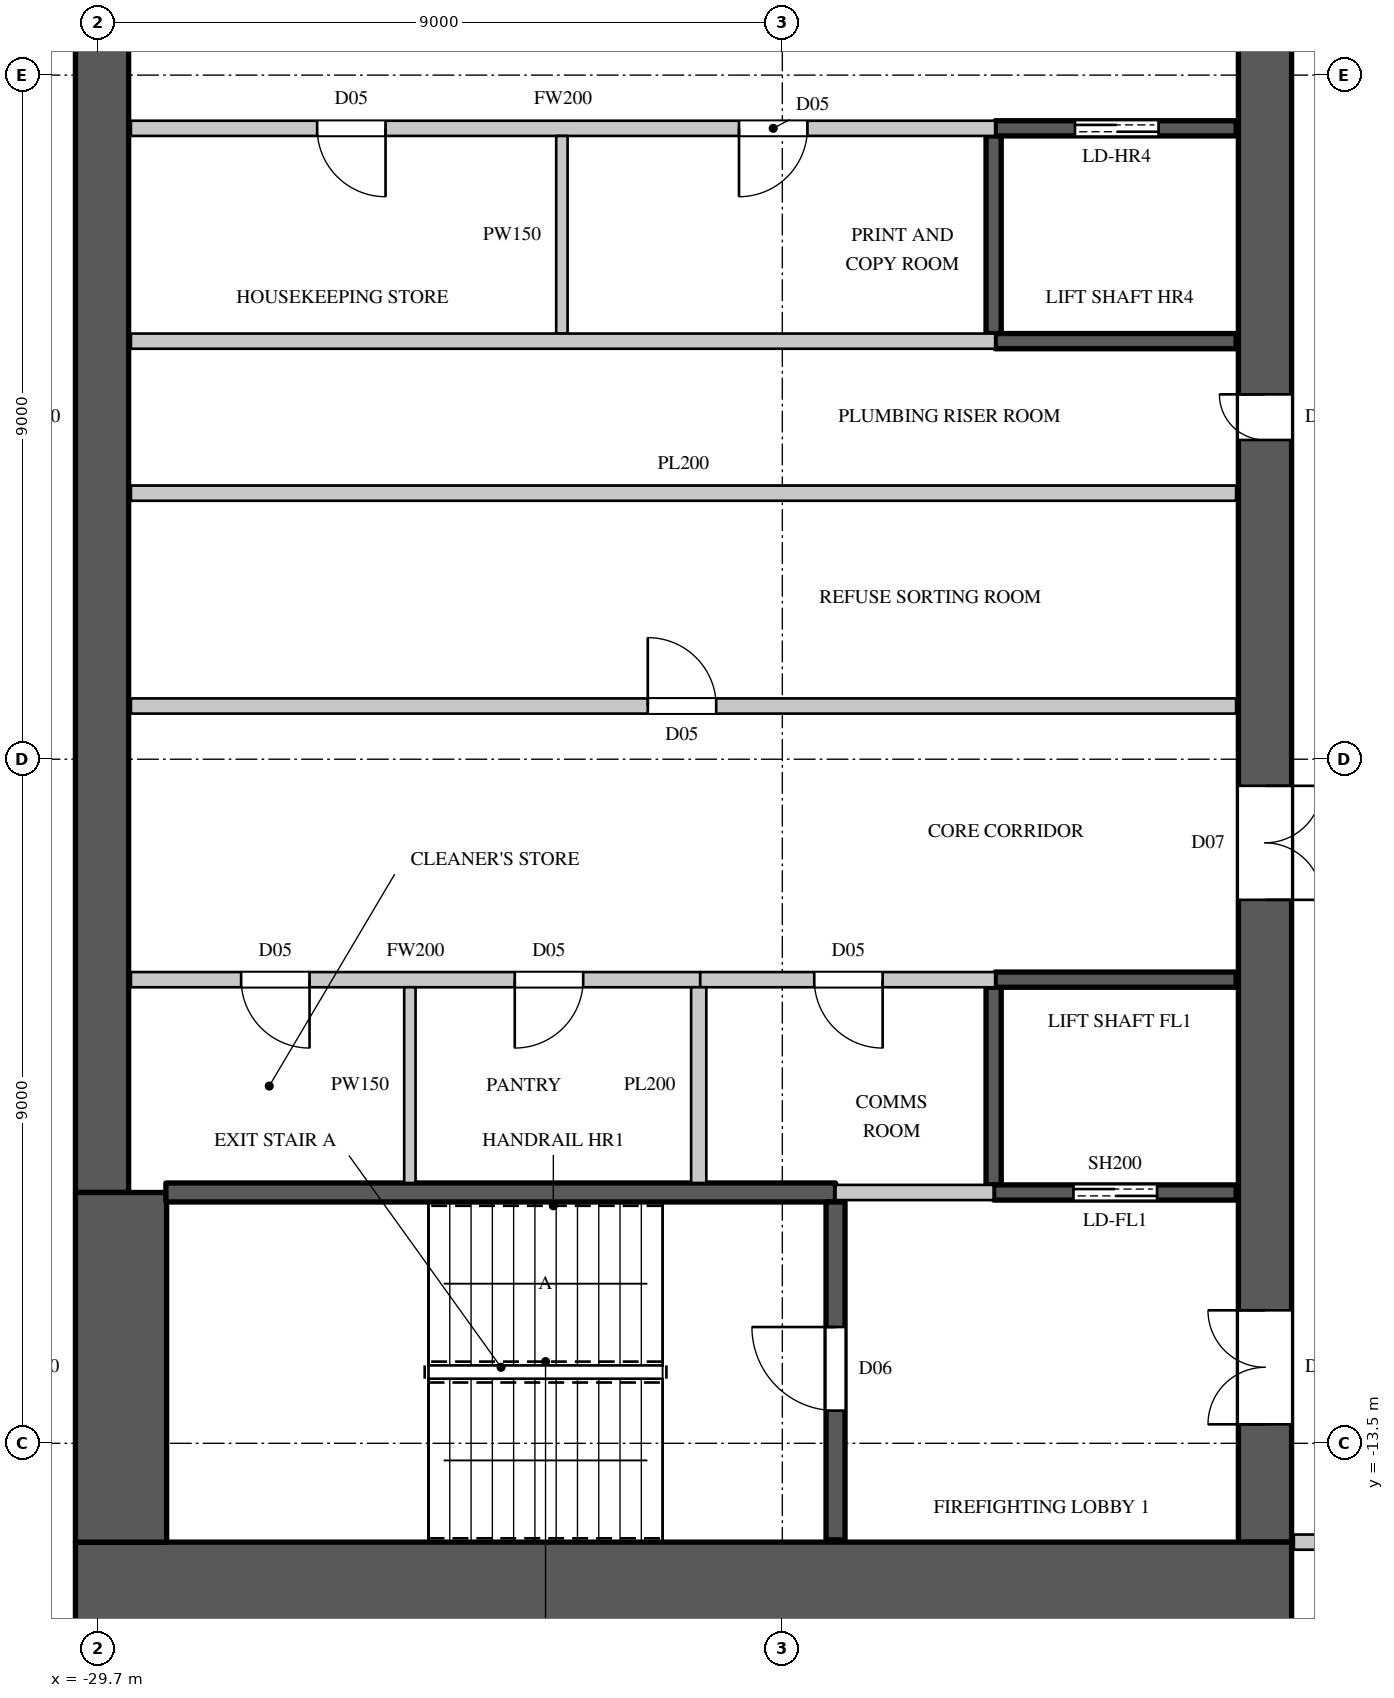
"""IFC4 building model, lengths in metres.
Left out: names, types, materials, properties, quantities, classifications, styles, units other than length and angle.
Written with IfcOpenShell. Run it as: python <this file> out.ifc"""

import sys

from ifc_helpers import new_model, si_unit, direction, frame, frame_2d, origin, place, context, subcontext, project, spatial, rectangle, extrude, element, fill, save


model = new_model("IFC4")
c1 = context("Model", 3, precision=1e-05, world=origin(), true_north=direction((0.0, 1.0)))
c2 = subcontext(c1, "Body", "Model", "MODEL_VIEW")
j1 = project(units=[si_unit("LENGTHUNIT", "METRE"), si_unit("PLANEANGLEUNIT", "RADIAN")], contexts=[c1])
p1 = place(None, origin())
s1 = spatial("IfcSite", under=j1, at=p1, CompositionType="ELEMENT")
p2 = place(p1, origin())
s2 = spatial("IfcBuilding", under=s1, at=p2, CompositionType="ELEMENT")
p3 = place(p2, frame((0.0, 0.0, 309.0)))
s3 = spatial("IfcBuildingStorey", under=s2, at=p3, CompositionType="ELEMENT", Elevation=309.0)
p4 = place(p3, frame((-30.0, -15.4, 0.0), z_axis=(0.0, 0.0, 1.0), x_axis=(1.0, 0.0, 0.0)))
e1 = element("IfcWall", 1, at=p4, inside=s3, PredefinedType="SHEAR", context=c2, shape_type="SweptSolid", body=[
    extrude(rectangle(XDim=16.0, YDim=1.2, at=frame_2d((8.0, 0.0))), origin(), (0.0, 0.0, 1.0), 4.1),
])
p5 = place(p3, frame((-14.35, -14.8, 0.0), z_axis=(0.0, 0.0, 1.0), x_axis=(0.0, 1.0, 0.0)))
e2 = element("IfcWall", 2, at=p5, inside=s3, PredefinedType="SHEAR", context=c2, shape_type="SweptSolid", body=[
    extrude(rectangle(XDim=29.6, YDim=0.7, at=frame_2d((14.8, 0.0))), origin(), (0.0, 0.0, 1.0), 4.1),
])
p6 = place(p5, frame((1.55, 0.0, 0.0)))
e3 = element("IfcOpeningElement", 3, at=p6, cuts=e2, PredefinedType="OPENING", context=c2, shape_type="SweptSolid", body=[
    extrude(rectangle(XDim=1.5, YDim=2.4, at=frame_2d((0.75, 1.2))), frame((0.0, 0.36, 0.0), z_axis=(0.0, -1.0, 0.0), x_axis=(1.0, 0.0, 0.0)), (0.0, 0.0, 1.0), 0.72),
])
p7 = place(p5, frame((26.55, 0.0, 0.0)))
e4 = element("IfcOpeningElement", 4, at=p7, cuts=e2, PredefinedType="OPENING", context=c2, shape_type="SweptSolid", body=[
    extrude(rectangle(XDim=1.5, YDim=2.4, at=frame_2d((0.75, 1.2))), frame((0.0, 0.36, 0.0), z_axis=(0.0, -1.0, 0.0), x_axis=(1.0, 0.0, 0.0)), (0.0, 0.0, 1.0), 0.72),
])
p8 = place(p5, frame((8.45, 0.0, 0.0)))
e5 = element("IfcOpeningElement", 5, at=p8, cuts=e2, PredefinedType="OPENING", context=c2, shape_type="SweptSolid", body=[
    extrude(rectangle(XDim=1.5, YDim=2.4, at=frame_2d((0.75, 1.2))), frame((0.0, 0.36, 0.0), z_axis=(0.0, -1.0, 0.0), x_axis=(1.0, 0.0, 0.0)), (0.0, 0.0, 1.0), 0.72),
])
p9 = place(p5, frame((19.65, 0.0, 0.0)))
e6 = element("IfcOpeningElement", 6, at=p9, cuts=e2, PredefinedType="OPENING", context=c2, shape_type="SweptSolid", body=[
    extrude(rectangle(XDim=1.5, YDim=2.4, at=frame_2d((0.75, 1.2))), frame((0.0, 0.36, 0.0), z_axis=(0.0, -1.0, 0.0), x_axis=(1.0, 0.0, 0.0)), (0.0, 0.0, 1.0), 0.72),
])
p10 = place(p5, frame((14.5, 0.0, 0.0)))
e7 = element("IfcOpeningElement", 7, at=p10, cuts=e2, PredefinedType="OPENING", context=c2, shape_type="SweptSolid", body=[
    extrude(rectangle(XDim=0.6, YDim=2.0, at=frame_2d((0.3, 1.0))), frame((0.0, 0.36, 0.0), z_axis=(0.0, -1.0, 0.0), x_axis=(1.0, 0.0, 0.0)), (0.0, 0.0, 1.0), 0.72),
])
p11 = place(p3, frame((-29.65, -10.2, 0.0), z_axis=(0.0, 0.0, 1.0), x_axis=(0.0, 1.0, 0.0)))
e8 = element("IfcWall", 8, at=p11, inside=s3, PredefinedType="SHEAR", context=c2, shape_type="SweptSolid", body=[
    extrude(rectangle(XDim=20.4, YDim=0.7, at=frame_2d((10.2, 0.0))), origin(), (0.0, 0.0, 1.0), 4.1),
])
p12 = place(p3, frame((-29.4, -14.8, 0.0), z_axis=(0.0, 0.0, 1.0), x_axis=(0.0, 1.0, 0.0)))
e9 = element("IfcWall", 9, at=p12, inside=s3, PredefinedType="SHEAR", context=c2, shape_type="SweptSolid", body=[
    extrude(rectangle(XDim=4.6, YDim=1.2, at=frame_2d((2.3, 0.0))), origin(), (0.0, 0.0, 1.0), 4.1),
])
p13 = place(p3, frame((-29.27, -7.4, 0.0), z_axis=(0.0, 0.0, 1.0), x_axis=(1.0, 0.0, 0.0)))
e10 = element("IfcWall", 10, at=p13, inside=s3, PredefinedType="PARTITIONING", context=c2, shape_type="SweptSolid", body=[
    extrude(rectangle(XDim=7.49, YDim=0.2, at=frame_2d((3.745, 0.0))), origin(), (0.0, 0.0, 1.0), 3.8),
])
p14 = place(p13, frame((1.45, 0.0, 0.0)))
e11 = element("IfcOpeningElement", 11, at=p14, cuts=e10, PredefinedType="OPENING", context=c2, shape_type="SweptSolid", body=[
    extrude(rectangle(XDim=0.9, YDim=2.2, at=frame_2d((0.45, 1.1))), frame((0.0, 0.11, 0.0), z_axis=(0.0, -1.0, 0.0), x_axis=(1.0, 0.0, 0.0)), (0.0, 0.0, 1.0), 0.22),
])
p15 = place(p13, frame((5.05, 0.0, 0.0)))
e12 = element("IfcOpeningElement", 12, at=p15, cuts=e10, PredefinedType="OPENING", context=c2, shape_type="SweptSolid", body=[
    extrude(rectangle(XDim=0.9, YDim=2.2, at=frame_2d((0.45, 1.1))), frame((0.0, 0.11, 0.0), z_axis=(0.0, -1.0, 0.0), x_axis=(1.0, 0.0, 0.0)), (0.0, 0.0, 1.0), 0.22),
])
p16 = place(p3, frame((-29.27, -3.8, 0.0), z_axis=(0.0, 0.0, 1.0), x_axis=(1.0, 0.0, 0.0)))
e13 = element("IfcWall", 13, at=p16, inside=s3, PredefinedType="PARTITIONING", context=c2, shape_type="SweptSolid", body=[
    extrude(rectangle(XDim=14.54, YDim=0.2, at=frame_2d((7.27, 0.0))), origin(), (0.0, 0.0, 1.0), 3.8),
])
p17 = place(p16, frame((6.8, 0.0, 0.0)))
e14 = element("IfcOpeningElement", 14, at=p17, cuts=e13, PredefinedType="OPENING", context=c2, shape_type="SweptSolid", body=[
    extrude(rectangle(XDim=0.9, YDim=2.2, at=frame_2d((0.45, 1.1))), frame((0.0, 0.11, 0.0), z_axis=(0.0, -1.0, 0.0), x_axis=(1.0, 0.0, 0.0)), (0.0, 0.0, 1.0), 0.22),
])
p18 = place(p3, frame((-29.27, 3.8, 0.0), z_axis=(0.0, 0.0, 1.0), x_axis=(1.0, 0.0, 0.0)))
e15 = element("IfcWall", 15, at=p18, inside=s3, PredefinedType="PARTITIONING", context=c2, shape_type="SweptSolid", body=[
    extrude(rectangle(XDim=11.37, YDim=0.2, at=frame_2d((5.685, 0.0))), origin(), (0.0, 0.0, 1.0), 3.8),
])
p19 = place(p18, frame((2.45, 0.0, 0.0)))
e16 = element("IfcOpeningElement", 16, at=p19, cuts=e15, PredefinedType="OPENING", context=c2, shape_type="SweptSolid", body=[
    extrude(rectangle(XDim=0.9, YDim=2.2, at=frame_2d((0.45, 1.1))), frame((0.0, 0.11, 0.0), z_axis=(0.0, -1.0, 0.0), x_axis=(1.0, 0.0, 0.0)), (0.0, 0.0, 1.0), 0.22),
])
p20 = place(p18, frame((8.0, 0.0, 0.0)))
e17 = element("IfcOpeningElement", 17, at=p20, cuts=e15, PredefinedType="OPENING", context=c2, shape_type="SweptSolid", body=[
    extrude(rectangle(XDim=0.9, YDim=2.2, at=frame_2d((0.45, 1.1))), frame((0.0, 0.11, 0.0), z_axis=(0.0, -1.0, 0.0), x_axis=(1.0, 0.0, 0.0)), (0.0, 0.0, 1.0), 0.22),
])
p21 = place(p3, frame((-13.97, -14.8, 0.0), z_axis=(0.0, 0.0, 1.0), x_axis=(1.0, 0.0, 0.0)))
e18 = element("IfcWall", 18, at=p21, inside=s3, PredefinedType="PARTITIONING", context=c2, shape_type="SweptSolid", body=[
    extrude(rectangle(XDim=2.87, YDim=0.2, at=frame_2d((1.435, 0.0))), origin(), (0.0, 0.0, 1.0), 3.8),
])
p22 = place(p3, frame((-25.6, -10.075, 0.0), z_axis=(0.0, 0.0, 1.0), x_axis=(0.0, 1.0, 0.0)))
e19 = element("IfcWall", 19, at=p22, inside=s3, PredefinedType="PARTITIONING", context=c2, shape_type="SweptSolid", body=[
    extrude(rectangle(XDim=2.575, YDim=0.15, at=frame_2d((1.288, 0.0))), origin(), (0.0, 0.0, 1.0), 3.8),
])
p23 = place(p3, frame((-23.6, 1.1, 0.0), z_axis=(0.0, 0.0, 1.0), x_axis=(0.0, 1.0, 0.0)))
e20 = element("IfcWall", 20, at=p23, inside=s3, PredefinedType="PARTITIONING", context=c2, shape_type="SweptSolid", body=[
    extrude(rectangle(XDim=2.6, YDim=0.15, at=frame_2d((1.3, 0.0))), origin(), (0.0, 0.0, 1.0), 3.8),
])
p24 = place(p3, frame((-29.27, -1.0, 0.0), z_axis=(0.0, 0.0, 1.0), x_axis=(1.0, 0.0, 0.0)))
e21 = element("IfcWall", 21, at=p24, inside=s3, PredefinedType="PARTITIONING", context=c2, shape_type="SweptSolid", body=[
    extrude(rectangle(XDim=14.54, YDim=0.2, at=frame_2d((7.27, 0.0))), origin(), (0.0, 0.0, 1.0), 3.8),
])
p25 = place(p3, frame((-29.27, 1.0, 0.0), z_axis=(0.0, 0.0, 1.0), x_axis=(1.0, 0.0, 0.0)))
e22 = element("IfcWall", 22, at=p25, inside=s3, PredefinedType="PARTITIONING", context=c2, shape_type="SweptSolid", body=[
    extrude(rectangle(XDim=11.37, YDim=0.2, at=frame_2d((5.685, 0.0))), origin(), (0.0, 0.0, 1.0), 3.8),
])
p26 = place(p3, frame((-21.78, -7.4, 0.0), z_axis=(0.0, 0.0, 1.0), x_axis=(1.0, 0.0, 0.0)))
e23 = element("IfcWall", 23, at=p26, inside=s3, PredefinedType="PARTITIONING", context=c2, shape_type="SweptSolid", body=[
    extrude(rectangle(XDim=3.88, YDim=0.2, at=frame_2d((1.94, 0.0))), origin(), (0.0, 0.0, 1.0), 3.8),
])
p27 = place(p26, frame((1.5, 0.0, 0.0)))
e24 = element("IfcOpeningElement", 24, at=p27, cuts=e23, PredefinedType="OPENING", context=c2, shape_type="SweptSolid", body=[
    extrude(rectangle(XDim=0.9, YDim=2.2, at=frame_2d((0.45, 1.1))), frame((0.0, 0.11, 0.0), z_axis=(0.0, -1.0, 0.0), x_axis=(1.0, 0.0, 0.0)), (0.0, 0.0, 1.0), 0.22),
])
p28 = place(p3, frame((-21.8, -10.075, 0.0), z_axis=(0.0, 0.0, 1.0), x_axis=(0.0, 1.0, 0.0)))
e25 = element("IfcWall", 25, at=p28, inside=s3, PredefinedType="PARTITIONING", context=c2, shape_type="SweptSolid", body=[
    extrude(rectangle(XDim=2.575, YDim=0.2, at=frame_2d((1.288, 0.0))), origin(), (0.0, 0.0, 1.0), 3.8),
])
p29 = place(p3, frame((-20.0, -10.2, 0.0), z_axis=(0.0, 0.0, 1.0), x_axis=(1.0, 0.0, 0.0)))
e26 = element("IfcWall", 26, at=p29, inside=s3, PredefinedType="PARTITIONING", context=c2, shape_type="SweptSolid", body=[
    extrude(rectangle(XDim=2.08, YDim=0.2, at=frame_2d((1.04, 0.0))), origin(), (0.0, 0.0, 1.0), 3.8),
])
p30 = place(p3, frame((-17.92, -10.1, 0.0), z_axis=(0.0, 0.0, 1.0), x_axis=(0.0, 1.0, 0.0)))
e27 = element("IfcWall", 27, at=p30, inside=s3, PredefinedType="SHEAR", context=c2, shape_type="SweptSolid", body=[
    extrude(rectangle(XDim=2.6, YDim=0.2, at=frame_2d((1.3, 0.0))), origin(), (0.0, 0.0, 1.0), 3.8),
])
p31 = place(p3, frame((-17.92, -10.2, 0.0), z_axis=(0.0, 0.0, 1.0), x_axis=(1.0, 0.0, 0.0)))
e28 = element("IfcWall", 28, at=p31, inside=s3, PredefinedType="SHEAR", context=c2, shape_type="SweptSolid", body=[
    extrude(rectangle(XDim=3.19, YDim=0.2, at=frame_2d((1.595, 0.0))), origin(), (0.0, 0.0, 1.0), 3.8),
])
p32 = place(p31, frame((1.05, 0.0, 0.0)))
e29 = element("IfcOpeningElement", 29, at=p32, cuts=e28, PredefinedType="OPENING", context=c2, shape_type="SweptSolid", body=[
    extrude(rectangle(XDim=1.1, YDim=2.2, at=frame_2d((0.55, 1.1))), frame((0.0, 0.11, 0.0), z_axis=(0.0, -1.0, 0.0), x_axis=(1.0, 0.0, 0.0)), (0.0, 0.0, 1.0), 0.22),
])
p33 = place(p3, frame((-17.9, -7.4, 0.0), z_axis=(0.0, 0.0, 1.0), x_axis=(1.0, 0.0, 0.0)))
e30 = element("IfcWall", 30, at=p33, inside=s3, PredefinedType="SHEAR", context=c2, shape_type="SweptSolid", body=[
    extrude(rectangle(XDim=3.17, YDim=0.2, at=frame_2d((1.585, 0.0))), origin(), (0.0, 0.0, 1.0), 3.8),
])
p34 = place(p3, frame((-17.92, 1.1, 0.0), z_axis=(0.0, 0.0, 1.0), x_axis=(0.0, 1.0, 0.0)))
e31 = element("IfcWall", 31, at=p34, inside=s3, PredefinedType="SHEAR", context=c2, shape_type="SweptSolid", body=[
    extrude(rectangle(XDim=2.6, YDim=0.2, at=frame_2d((1.3, 0.0))), origin(), (0.0, 0.0, 1.0), 3.8),
])
p35 = place(p3, frame((-17.9, 1.0, 0.0), z_axis=(0.0, 0.0, 1.0), x_axis=(1.0, 0.0, 0.0)))
e32 = element("IfcWall", 32, at=p35, inside=s3, PredefinedType="SHEAR", context=c2, shape_type="SweptSolid", body=[
    extrude(rectangle(XDim=3.17, YDim=0.2, at=frame_2d((1.585, 0.0))), origin(), (0.0, 0.0, 1.0), 3.8),
])
p36 = place(p3, frame((-17.9, 3.8, 0.0), z_axis=(0.0, 0.0, 1.0), x_axis=(1.0, 0.0, 0.0)))
e33 = element("IfcWall", 33, at=p36, inside=s3, PredefinedType="SHEAR", context=c2, shape_type="SweptSolid", body=[
    extrude(rectangle(XDim=3.17, YDim=0.2, at=frame_2d((1.585, 0.0))), origin(), (0.0, 0.0, 1.0), 3.8),
])
p37 = place(p36, frame((1.05, 0.0, 0.0)))
e34 = element("IfcOpeningElement", 34, at=p37, cuts=e33, PredefinedType="OPENING", context=c2, shape_type="SweptSolid", body=[
    extrude(rectangle(XDim=1.1, YDim=2.2, at=frame_2d((0.55, 1.1))), frame((0.0, 0.11, 0.0), z_axis=(0.0, -1.0, 0.0), x_axis=(1.0, 0.0, 0.0)), (0.0, 0.0, 1.0), 0.22),
])
p38 = place(p3, frame((-28.81, -10.2, 0.0), z_axis=(0.0, 0.0, 1.0), x_axis=(1.0, 0.0, 0.0)))
e35 = element("IfcWall", 35, at=p38, inside=s3, PredefinedType="SHEAR", context=c2, shape_type="SweptSolid", body=[
    extrude(rectangle(XDim=8.81, YDim=0.25, at=frame_2d((4.405, 0.0))), origin(), (0.0, 0.0, 1.0), 3.8),
])
p39 = place(p3, frame((-20.0, -14.77, 0.0), z_axis=(0.0, 0.0, 1.0), x_axis=(0.0, 1.0, 0.0)))
e36 = element("IfcWall", 36, at=p39, inside=s3, PredefinedType="SHEAR", context=c2, shape_type="SweptSolid", body=[
    extrude(rectangle(XDim=4.445, YDim=0.25, at=frame_2d((2.223, 0.0))), origin(), (0.0, 0.0, 1.0), 3.8),
])
p40 = place(p39, frame((1.7, 0.0, 0.0)))
e37 = element("IfcOpeningElement", 37, at=p40, cuts=e36, PredefinedType="OPENING", context=c2, shape_type="SweptSolid", body=[
    extrude(rectangle(XDim=1.1, YDim=2.2, at=frame_2d((0.55, 1.1))), frame((0.0, 0.135, 0.0), z_axis=(0.0, -1.0, 0.0), x_axis=(1.0, 0.0, 0.0)), (0.0, 0.0, 1.0), 0.27),
])
p41 = place(p40, origin())
e38 = element("IfcDoor", 38, at=p41, inside=s3, OperationType="SINGLE_SWING_RIGHT", PredefinedType="DOOR", context=c2, shape_type="SweptSolid", body=[
    extrude(rectangle(XDim=1.1, YDim=2.2, at=frame_2d((0.55, 1.1))), frame((0.0, 0.025, 0.0), z_axis=(0.0, -1.0, 0.0), x_axis=(1.0, 0.0, 0.0)), (0.0, 0.0, 1.0), 0.05),
])
fill(e37, e38)
p42 = place(p14, origin())
e39 = element("IfcDoor", 39, at=p42, inside=s3, OperationType="SINGLE_SWING_LEFT", PredefinedType="DOOR", context=c2, shape_type="SweptSolid", body=[
    extrude(rectangle(XDim=0.9, YDim=2.2, at=frame_2d((0.45, 1.1))), frame((0.0, 0.025, 0.0), z_axis=(0.0, -1.0, 0.0), x_axis=(1.0, 0.0, 0.0)), (0.0, 0.0, 1.0), 0.05),
])
fill(e11, e39)
p43 = place(p15, origin())
e40 = element("IfcDoor", 40, at=p43, inside=s3, OperationType="SINGLE_SWING_RIGHT", PredefinedType="DOOR", context=c2, shape_type="SweptSolid", body=[
    extrude(rectangle(XDim=0.9, YDim=2.2, at=frame_2d((0.45, 1.1))), frame((0.0, 0.025, 0.0), z_axis=(0.0, -1.0, 0.0), x_axis=(1.0, 0.0, 0.0)), (0.0, 0.0, 1.0), 0.05),
])
fill(e12, e40)
p44 = place(p27, origin())
e41 = element("IfcDoor", 41, at=p44, inside=s3, OperationType="SINGLE_SWING_LEFT", PredefinedType="DOOR", context=c2, shape_type="SweptSolid", body=[
    extrude(rectangle(XDim=0.9, YDim=2.2, at=frame_2d((0.45, 1.1))), frame((0.0, 0.025, 0.0), z_axis=(0.0, -1.0, 0.0), x_axis=(1.0, 0.0, 0.0)), (0.0, 0.0, 1.0), 0.05),
])
fill(e24, e41)
p45 = place(p17, origin())
e42 = element("IfcDoor", 42, at=p45, inside=s3, OperationType="SINGLE_SWING_LEFT", PredefinedType="DOOR", context=c2, shape_type="SweptSolid", body=[
    extrude(rectangle(XDim=0.9, YDim=2.2, at=frame_2d((0.45, 1.1))), frame((0.0, 0.025, 0.0), z_axis=(0.0, -1.0, 0.0), x_axis=(1.0, 0.0, 0.0)), (0.0, 0.0, 1.0), 0.05),
])
fill(e14, e42)
p46 = place(p19, origin())
e43 = element("IfcDoor", 43, at=p46, inside=s3, OperationType="SINGLE_SWING_LEFT", PredefinedType="DOOR", context=c2, shape_type="SweptSolid", body=[
    extrude(rectangle(XDim=0.9, YDim=2.2, at=frame_2d((0.45, 1.1))), frame((0.0, 0.025, 0.0), z_axis=(0.0, -1.0, 0.0), x_axis=(1.0, 0.0, 0.0)), (0.0, 0.0, 1.0), 0.05),
])
fill(e16, e43)
p47 = place(p20, origin())
e44 = element("IfcDoor", 44, at=p47, inside=s3, OperationType="SINGLE_SWING_RIGHT", PredefinedType="DOOR", context=c2, shape_type="SweptSolid", body=[
    extrude(rectangle(XDim=0.9, YDim=2.2, at=frame_2d((0.45, 1.1))), frame((0.0, 0.025, 0.0), z_axis=(0.0, -1.0, 0.0), x_axis=(1.0, 0.0, 0.0)), (0.0, 0.0, 1.0), 0.05),
])
fill(e17, e44)
p48 = place(p32, origin())
e45 = element("IfcDoor", 45, at=p48, inside=s3, OperationType="DOUBLE_DOOR_SLIDING", PredefinedType="DOOR", context=c2, shape_type="SweptSolid", body=[
    extrude(rectangle(XDim=1.1, YDim=2.2, at=frame_2d((0.55, 1.1))), frame((0.0, 0.025, 0.0), z_axis=(0.0, -1.0, 0.0), x_axis=(1.0, 0.0, 0.0)), (0.0, 0.0, 1.0), 0.05),
])
fill(e29, e45)
p49 = place(p37, origin())
e46 = element("IfcDoor", 46, at=p49, inside=s3, OperationType="DOUBLE_DOOR_SLIDING", PredefinedType="DOOR", context=c2, shape_type="SweptSolid", body=[
    extrude(rectangle(XDim=1.1, YDim=2.2, at=frame_2d((0.55, 1.1))), frame((0.0, 0.025, 0.0), z_axis=(0.0, -1.0, 0.0), x_axis=(1.0, 0.0, 0.0)), (0.0, 0.0, 1.0), 0.05),
])
fill(e34, e46)
p50 = place(p6, origin())
e47 = element("IfcDoor", 47, at=p50, inside=s3, OperationType="DOUBLE_DOOR_SINGLE_SWING", PredefinedType="DOOR", context=c2, shape_type="SweptSolid", body=[
    extrude(rectangle(XDim=1.5, YDim=2.4, at=frame_2d((0.75, 1.2))), frame((0.0, 0.345, 0.0), z_axis=(0.0, -1.0, 0.0), x_axis=(1.0, 0.0, 0.0)), (0.0, 0.0, 1.0), 0.05),
])
fill(e3, e47)
p51 = place(p8, origin())
e48 = element("IfcDoor", 48, at=p51, inside=s3, OperationType="DOUBLE_DOOR_SINGLE_SWING", PredefinedType="DOOR", context=c2, shape_type="SweptSolid", body=[
    extrude(rectangle(XDim=1.5, YDim=2.4, at=frame_2d((0.75, 1.2))), frame((0.0, -0.295, 0.0), z_axis=(0.0, -1.0, 0.0), x_axis=(1.0, 0.0, 0.0)), (0.0, 0.0, 1.0), 0.05),
])
fill(e5, e48)
p52 = place(p10, origin())
e49 = element("IfcDoor", 49, at=p52, inside=s3, OperationType="SINGLE_SWING_RIGHT", PredefinedType="DOOR", context=c2, shape_type="SweptSolid", body=[
    extrude(rectangle(XDim=0.6, YDim=2.0, at=frame_2d((0.3, 1.0))), frame((0.0, 0.345, 0.0), z_axis=(0.0, -1.0, 0.0), x_axis=(1.0, 0.0, 0.0)), (0.0, 0.0, 1.0), 0.05),
])
fill(e7, e49)
save(model, sys.argv[1])
